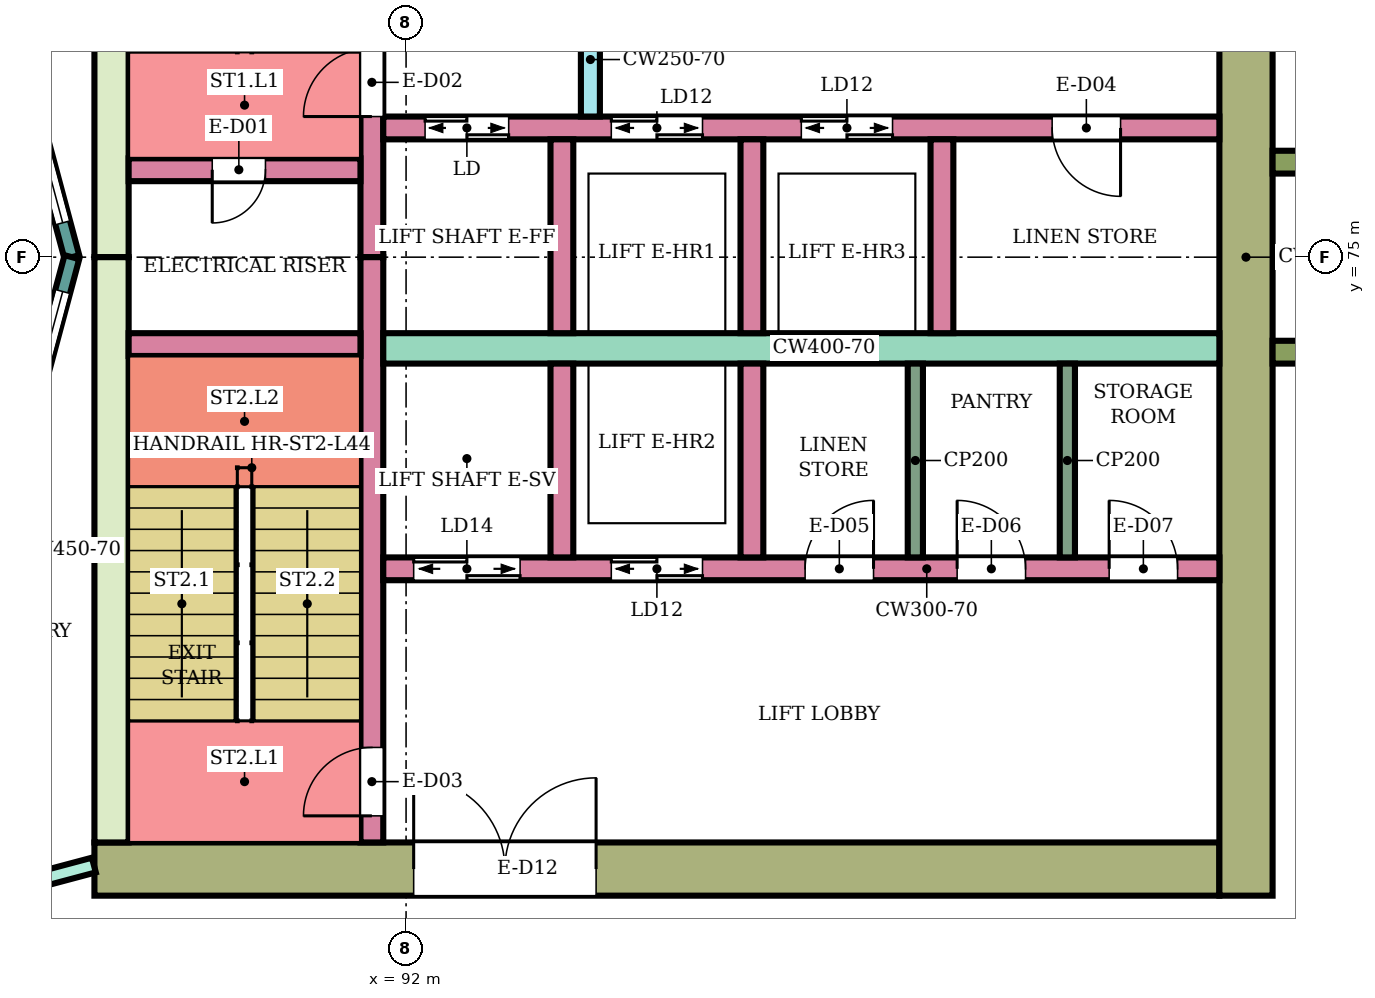
"""IFC4 building model, lengths in metres.
Left out: names, types, materials, properties, quantities, classifications, styles, units other than length and angle.
Written with IfcOpenShell. Run it as: python <this file> out.ifc"""

import sys

from ifc_helpers import new_model, si_unit, direction, frame, frame_2d, origin, place, context, subcontext, project, spatial, rectangle, extrude, element, fill, save


model = new_model("IFC4")
c1 = context("Model", 3, precision=1e-05, world=origin(), true_north=direction((0.0, 1.0)))
c2 = subcontext(c1, "Body", "Model", "MODEL_VIEW")
j1 = project(units=[si_unit("LENGTHUNIT", "METRE"), si_unit("PLANEANGLEUNIT", "RADIAN")], contexts=[c1])
p1 = place(None, origin())
s1 = spatial("IfcSite", under=j1, at=p1, CompositionType="ELEMENT")
p2 = place(p1, origin())
s2 = spatial("IfcBuilding", under=s1, at=p2, CompositionType="ELEMENT")
p3 = place(p2, frame((0.0, 0.0, 190.5)))
s3 = spatial("IfcBuildingStorey", under=s2, at=p3, CompositionType="ELEMENT", Elevation=190.5)
p4 = place(p3, frame((87.9, 66.95, 0.0), z_axis=(0.0, 0.0, 1.0), x_axis=(1.0, 0.0, 0.0)))
e1 = element("IfcWall", 1, at=p4, inside=s3, PredefinedType="SHEAR", context=c2, shape_type="SweptSolid", body=[
    extrude(rectangle(XDim=14.8, YDim=0.7, at=frame_2d((7.4, 0.0))), origin(), (0.0, 0.0, 1.0), 3.78),
])
p5 = place(p4, frame((4.2, 0.0, 0.0)))
e2 = element("IfcOpeningElement", 2, at=p5, cuts=e1, PredefinedType="OPENING", context=c2, shape_type="SweptSolid", body=[
    extrude(rectangle(XDim=2.4, YDim=2.4, at=frame_2d((1.2, 1.2))), frame((0.0, 0.36, 0.0), z_axis=(0.0, -1.0, 0.0), x_axis=(1.0, 0.0, 0.0)), (0.0, 0.0, 1.0), 0.72),
])
for number, where, z_axis, x_axis in (
    (3, (88.125, 75.0, 0.0), (0.0, 0.0, 1.0), (0.0, 1.0, 0.0)),
    (4, (88.125, 67.3, 0.0), (0.0, 0.0, 1.0), (0.0, 1.0, 0.0)),
):
    element("IfcWall", number, at=place(p3, frame(where, z_axis=z_axis, x_axis=x_axis)), inside=s3, PredefinedType="SHEAR", context=c2, shape_type="SweptSolid", body=[
        extrude(rectangle(XDim=7.7, YDim=0.45, at=frame_2d((3.85, 0.0))), origin(), (0.0, 0.0, 1.0), 3.78),
    ])
p6 = place(p3, frame((103.05, 66.6, 0.0), z_axis=(0.0, 0.0, 1.0), x_axis=(0.0, 1.0, 0.0)))
e5 = element("IfcWall", 5, at=p6, inside=s3, PredefinedType="SHEAR", context=c2, shape_type="SweptSolid", body=[
    extrude(rectangle(XDim=16.8, YDim=0.7, at=frame_2d((8.4, 0.0))), origin(), (0.0, 0.0, 1.0), 3.78),
])
p7 = place(p3, frame((91.55, 75.0, 0.0), z_axis=(0.0, 0.0, 1.0), x_axis=(0.0, 1.0, 0.0)))
e6 = element("IfcWall", 6, at=p7, inside=s3, PredefinedType="SHEAR", context=c2, shape_type="SweptSolid", body=[
    extrude(rectangle(XDim=7.7, YDim=0.3, at=frame_2d((3.85, 0.0))), origin(), (0.0, 0.0, 1.0), 3.78),
])
p8 = place(p7, frame((1.85, 0.0, 0.0)))
e7 = element("IfcOpeningElement", 7, at=p8, cuts=e6, PredefinedType="OPENING", context=c2, shape_type="SweptSolid", body=[
    extrude(rectangle(XDim=0.9, YDim=2.1, at=frame_2d((0.45, 1.05))), frame((0.0, 0.16, 0.0), z_axis=(0.0, -1.0, 0.0), x_axis=(1.0, 0.0, 0.0)), (0.0, 0.0, 1.0), 0.32),
])
p9 = place(p3, frame((91.55, 67.3, 0.0), z_axis=(0.0, 0.0, 1.0), x_axis=(0.0, 1.0, 0.0)))
e8 = element("IfcWall", 8, at=p9, inside=s3, PredefinedType="SHEAR", context=c2, shape_type="SweptSolid", body=[
    extrude(rectangle(XDim=7.7, YDim=0.3, at=frame_2d((3.85, 0.0))), origin(), (0.0, 0.0, 1.0), 3.78),
])
p10 = place(p9, frame((0.35, 0.0, 0.0)))
e9 = element("IfcOpeningElement", 9, at=p10, cuts=e8, PredefinedType="OPENING", context=c2, shape_type="SweptSolid", body=[
    extrude(rectangle(XDim=0.9, YDim=2.1, at=frame_2d((0.45, 1.05))), frame((0.0, 0.16, 0.0), z_axis=(0.0, -1.0, 0.0), x_axis=(1.0, 0.0, 0.0)), (0.0, 0.0, 1.0), 0.32),
])
p11 = place(p3, frame((88.35, 76.15, 0.0), z_axis=(0.0, 0.0, 1.0), x_axis=(1.0, 0.0, 0.0)))
e10 = element("IfcWall", 10, at=p11, inside=s3, PredefinedType="SHEAR", context=c2, shape_type="SweptSolid", body=[
    extrude(rectangle(XDim=3.05, YDim=0.3, at=frame_2d((1.525, 0.0))), origin(), (0.0, 0.0, 1.0), 3.78),
])
p12 = place(p11, frame((1.1, 0.0, 0.0)))
e11 = element("IfcOpeningElement", 11, at=p12, cuts=e10, PredefinedType="OPENING", context=c2, shape_type="SweptSolid", body=[
    extrude(rectangle(XDim=0.7, YDim=2.0, at=frame_2d((0.35, 1.0))), frame((0.0, 0.16, 0.0), z_axis=(0.0, -1.0, 0.0), x_axis=(1.0, 0.0, 0.0)), (0.0, 0.0, 1.0), 0.32),
])
p13 = place(p3, frame((88.35, 73.85, 0.0), z_axis=(0.0, 0.0, 1.0), x_axis=(1.0, 0.0, 0.0)))
e12 = element("IfcWall", 12, at=p13, inside=s3, PredefinedType="SHEAR", context=c2, shape_type="SweptSolid", body=[
    extrude(rectangle(XDim=3.05, YDim=0.3, at=frame_2d((1.525, 0.0))), origin(), (0.0, 0.0, 1.0), 3.78),
])
p14 = place(p3, frame((91.7, 76.7, 0.0), z_axis=(0.0, 0.0, 1.0), x_axis=(1.0, 0.0, 0.0)))
e13 = element("IfcWall", 13, at=p14, inside=s3, PredefinedType="SHEAR", context=c2, shape_type="SweptSolid", body=[
    extrude(rectangle(XDim=11.0, YDim=0.3, at=frame_2d((5.5, 0.0))), origin(), (0.0, 0.0, 1.0), 3.78),
])
p15 = place(p14, frame((0.55, 0.0, 0.0)))
e14 = element("IfcOpeningElement", 14, at=p15, cuts=e13, PredefinedType="OPENING", context=c2, shape_type="SweptSolid", body=[
    extrude(rectangle(XDim=1.1, YDim=2.1, at=frame_2d((0.55, 1.05))), frame((0.0, 0.16, 0.0), z_axis=(0.0, -1.0, 0.0), x_axis=(1.0, 0.0, 0.0)), (0.0, 0.0, 1.0), 0.32),
])
p16 = place(p14, frame((3.0, 0.0, 0.0)))
e15 = element("IfcOpeningElement", 15, at=p16, cuts=e13, PredefinedType="OPENING", context=c2, shape_type="SweptSolid", body=[
    extrude(rectangle(XDim=1.2, YDim=2.1, at=frame_2d((0.6, 1.05))), frame((0.0, 0.16, 0.0), z_axis=(0.0, -1.0, 0.0), x_axis=(1.0, 0.0, 0.0)), (0.0, 0.0, 1.0), 0.32),
])
p17 = place(p14, frame((5.5, 0.0, 0.0)))
e16 = element("IfcOpeningElement", 16, at=p17, cuts=e13, PredefinedType="OPENING", context=c2, shape_type="SweptSolid", body=[
    extrude(rectangle(XDim=1.2, YDim=2.1, at=frame_2d((0.6, 1.05))), frame((0.0, 0.16, 0.0), z_axis=(0.0, -1.0, 0.0), x_axis=(1.0, 0.0, 0.0)), (0.0, 0.0, 1.0), 0.32),
])
p18 = place(p14, frame((8.8, 0.0, 0.0)))
e17 = element("IfcOpeningElement", 17, at=p18, cuts=e13, PredefinedType="OPENING", context=c2, shape_type="SweptSolid", body=[
    extrude(rectangle(XDim=0.9, YDim=2.1, at=frame_2d((0.45, 1.05))), frame((0.0, 0.16, 0.0), z_axis=(0.0, -1.0, 0.0), x_axis=(1.0, 0.0, 0.0)), (0.0, 0.0, 1.0), 0.32),
])
p19 = place(p3, frame((91.7, 73.8, 0.0), z_axis=(0.0, 0.0, 1.0), x_axis=(1.0, 0.0, 0.0)))
e18 = element("IfcWall", 18, at=p19, inside=s3, PredefinedType="SHEAR", context=c2, shape_type="SweptSolid", body=[
    extrude(rectangle(XDim=11.0, YDim=0.4, at=frame_2d((5.5, 0.0))), origin(), (0.0, 0.0, 1.0), 3.78),
])
p20 = place(p3, frame((91.7, 70.9, 0.0), z_axis=(0.0, 0.0, 1.0), x_axis=(1.0, 0.0, 0.0)))
e19 = element("IfcWall", 19, at=p20, inside=s3, PredefinedType="SHEAR", context=c2, shape_type="SweptSolid", body=[
    extrude(rectangle(XDim=11.0, YDim=0.3, at=frame_2d((5.5, 0.0))), origin(), (0.0, 0.0, 1.0), 3.78),
])
p21 = place(p20, frame((0.4, 0.0, 0.0)))
e20 = element("IfcOpeningElement", 20, at=p21, cuts=e19, PredefinedType="OPENING", context=c2, shape_type="SweptSolid", body=[
    extrude(rectangle(XDim=1.4, YDim=2.1, at=frame_2d((0.7, 1.05))), frame((0.0, 0.16, 0.0), z_axis=(0.0, -1.0, 0.0), x_axis=(1.0, 0.0, 0.0)), (0.0, 0.0, 1.0), 0.32),
])
p22 = place(p20, frame((3.0, 0.0, 0.0)))
e21 = element("IfcOpeningElement", 21, at=p22, cuts=e19, PredefinedType="OPENING", context=c2, shape_type="SweptSolid", body=[
    extrude(rectangle(XDim=1.2, YDim=2.1, at=frame_2d((0.6, 1.05))), frame((0.0, 0.16, 0.0), z_axis=(0.0, -1.0, 0.0), x_axis=(1.0, 0.0, 0.0)), (0.0, 0.0, 1.0), 0.32),
])
p23 = place(p20, frame((5.55, 0.0, 0.0)))
e22 = element("IfcOpeningElement", 22, at=p23, cuts=e19, PredefinedType="OPENING", context=c2, shape_type="SweptSolid", body=[
    extrude(rectangle(XDim=0.9, YDim=2.1, at=frame_2d((0.45, 1.05))), frame((0.0, 0.16, 0.0), z_axis=(0.0, -1.0, 0.0), x_axis=(1.0, 0.0, 0.0)), (0.0, 0.0, 1.0), 0.32),
])
p24 = place(p20, frame((7.55, 0.0, 0.0)))
e23 = element("IfcOpeningElement", 23, at=p24, cuts=e19, PredefinedType="OPENING", context=c2, shape_type="SweptSolid", body=[
    extrude(rectangle(XDim=0.9, YDim=2.1, at=frame_2d((0.45, 1.05))), frame((0.0, 0.16, 0.0), z_axis=(0.0, -1.0, 0.0), x_axis=(1.0, 0.0, 0.0)), (0.0, 0.0, 1.0), 0.32),
])
p25 = place(p20, frame((9.55, 0.0, 0.0)))
e24 = element("IfcOpeningElement", 24, at=p25, cuts=e19, PredefinedType="OPENING", context=c2, shape_type="SweptSolid", body=[
    extrude(rectangle(XDim=0.9, YDim=2.1, at=frame_2d((0.45, 1.05))), frame((0.0, 0.16, 0.0), z_axis=(0.0, -1.0, 0.0), x_axis=(1.0, 0.0, 0.0)), (0.0, 0.0, 1.0), 0.32),
])
for number, where, z_axis, x_axis in (
    (25, (94.05, 74.0, 0.0), (0.0, 0.0, 1.0), (0.0, 1.0, 0.0)),
    (26, (96.55, 74.0, 0.0), (0.0, 0.0, 1.0), (0.0, 1.0, 0.0)),
    (27, (99.05, 74.0, 0.0), (0.0, 0.0, 1.0), (0.0, 1.0, 0.0)),
    (28, (94.05, 71.05, 0.0), (0.0, 0.0, 1.0), (0.0, 1.0, 0.0)),
    (29, (96.55, 71.05, 0.0), (0.0, 0.0, 1.0), (0.0, 1.0, 0.0)),
):
    element("IfcWall", number, at=place(p3, frame(where, z_axis=z_axis, x_axis=x_axis)), inside=s3, PredefinedType="SHEAR", context=c2, shape_type="SweptSolid", body=[
        extrude(rectangle(XDim=2.55, YDim=0.3, at=frame_2d((1.275, 0.0))), origin(), (0.0, 0.0, 1.0), 3.78),
    ])
p26 = place(p3, frame((94.425, 76.85, 0.0), z_axis=(0.0, 0.0, 1.0), x_axis=(0.0, 1.0, 0.0)))
e30 = element("IfcWall", 30, at=p26, inside=s3, PredefinedType="SHEAR", context=c2, shape_type="SweptSolid", body=[
    extrude(rectangle(XDim=1.5, YDim=0.25, at=frame_2d((0.75, 0.0))), origin(), (0.0, 0.0, 1.0), 3.78),
])
for number, where, z_axis, x_axis in (
    (31, (103.4, 73.75, 0.0), (0.0, 0.0, 1.0), (1.0, 0.0, 0.0)),
    (32, (103.4, 76.25, 0.0), (0.0, 0.0, 1.0), (1.0, 0.0, 0.0)),
):
    element("IfcWall", number, at=place(p3, frame(where, z_axis=z_axis, x_axis=x_axis)), inside=s3, PredefinedType="NOTDEFINED", context=c2, shape_type="SweptSolid", body=[
        extrude(rectangle(XDim=2.416, YDim=0.3, at=frame_2d((1.208, 0.0))), origin(), (0.0, 0.0, 1.0), 4.1),
    ])
p27 = place(p3, frame((87.604, 75.0, 0.0), z_axis=(0.0, 0.0, 1.0), x_axis=(-0.258789828301, 0.965933654434, 0.0)))
e33 = element("IfcWall", 33, at=p27, inside=s3, PredefinedType="NOTDEFINED", context=c2, shape_type="SweptSolid", body=[
    extrude(rectangle(XDim=3.936, YDim=0.2, at=frame_2d((1.968, 0.0))), origin(), (0.0, 0.0, 1.0), 4.1),
])
p28 = place(p27, frame((0.468, 0.0, 0.9)))
e34 = element("IfcOpeningElement", 34, at=p28, cuts=e33, PredefinedType="OPENING", context=c2, shape_type="SweptSolid", body=[
    extrude(rectangle(XDim=3.0, YDim=2.3, at=frame_2d((1.5, 1.15))), frame((0.0, 0.11, 0.0), z_axis=(0.0, -1.0, 0.0), x_axis=(1.0, 0.0, 0.0)), (0.0, 0.0, 1.0), 0.22),
])
p29 = place(p3, frame((86.585, 71.198, 0.0), z_axis=(0.0, 0.0, 1.0), x_axis=(0.258789828301, 0.965933654434, 0.0)))
e35 = element("IfcWall", 35, at=p29, inside=s3, PredefinedType="NOTDEFINED", context=c2, shape_type="SweptSolid", body=[
    extrude(rectangle(XDim=3.936, YDim=0.2, at=frame_2d((1.968, 0.0))), origin(), (0.0, 0.0, 1.0), 4.1),
])
p30 = place(p29, frame((0.468, 0.0, 0.9)))
e36 = element("IfcOpeningElement", 36, at=p30, cuts=e35, PredefinedType="OPENING", context=c2, shape_type="SweptSolid", body=[
    extrude(rectangle(XDim=3.0, YDim=2.3, at=frame_2d((1.5, 1.15))), frame((0.0, 0.11, 0.0), z_axis=(0.0, -1.0, 0.0), x_axis=(1.0, 0.0, 0.0)), (0.0, 0.0, 1.0), 0.22),
])
p31 = place(p3, frame((80.125, 64.932, 0.0), z_axis=(0.0, 0.0, 1.0), x_axis=(0.966236955806, 0.257655089674, 0.0)))
e37 = element("IfcWall", 37, at=p31, inside=s3, PredefinedType="PARTITIONING", context=c2, shape_type="SweptSolid", body=[
    extrude(rectangle(XDim=8.039, YDim=0.2, at=frame_2d((4.02, 0.0))), origin(), (0.0, 0.0, 1.0), 3.65),
])
p32 = place(p31, frame((6.298, 0.0, 0.0)))
e38 = element("IfcOpeningElement", 38, at=p32, cuts=e37, PredefinedType="OPENING", context=c2, shape_type="SweptSolid", body=[
    extrude(rectangle(XDim=0.9, YDim=2.1, at=frame_2d((0.45, 1.05))), frame((0.0, 0.11, 0.0), z_axis=(0.0, -1.0, 0.0), x_axis=(1.0, 0.0, 0.0)), (0.0, 0.0, 1.0), 0.22),
])
p33 = place(p31, frame((2.045, 0.0, 0.0)))
e39 = element("IfcOpeningElement", 39, at=p33, cuts=e37, PredefinedType="OPENING", context=c2, shape_type="SweptSolid", body=[
    extrude(rectangle(XDim=0.9, YDim=2.1, at=frame_2d((0.45, 1.05))), frame((0.0, 0.11, 0.0), z_axis=(0.0, -1.0, 0.0), x_axis=(1.0, 0.0, 0.0)), (0.0, 0.0, 1.0), 0.22),
])
for number, where, z_axis, x_axis in (
    (40, (98.7, 71.05, 0.0), (0.0, 0.0, 1.0), (0.0, 1.0, 0.0)),
    (41, (100.7, 71.05, 0.0), (0.0, 0.0, 1.0), (0.0, 1.0, 0.0)),
):
    element("IfcWall", number, at=place(p3, frame(where, z_axis=z_axis, x_axis=x_axis)), inside=s3, PredefinedType="PARTITIONING", context=c2, shape_type="SweptSolid", body=[
        extrude(rectangle(XDim=2.55, YDim=0.2, at=frame_2d((1.275, 0.0))), origin(), (0.0, 0.0, 1.0), 3.78),
    ])
p34 = place(p28, origin())
e42 = element("IfcWindow", 42, at=p34, inside=s3, PartitioningType="SINGLE_PANEL", PredefinedType="WINDOW", context=c2, shape_type="SweptSolid", body=[
    extrude(rectangle(XDim=3.0, YDim=2.3, at=frame_2d((1.5, 1.15))), frame((0.0, 0.03, 0.0), z_axis=(0.0, -1.0, 0.0), x_axis=(1.0, 0.0, 0.0)), (0.0, 0.0, 1.0), 0.06),
])
fill(e34, e42)
p35 = place(p30, origin())
e43 = element("IfcWindow", 43, at=p35, inside=s3, PartitioningType="SINGLE_PANEL", PredefinedType="WINDOW", context=c2, shape_type="SweptSolid", body=[
    extrude(rectangle(XDim=3.0, YDim=2.3, at=frame_2d((1.5, 1.15))), frame((0.0, 0.03, 0.0), z_axis=(0.0, -1.0, 0.0), x_axis=(1.0, 0.0, 0.0)), (0.0, 0.0, 1.0), 0.06),
])
fill(e36, e43)
p36 = place(p12, frame((0.7, 0.0, 0.0), z_axis=(0.0, 0.0, 1.0), x_axis=(-1.0, 0.0, 0.0)))
e44 = element("IfcDoor", 44, at=p36, inside=s3, OperationType="SINGLE_SWING_RIGHT", PredefinedType="DOOR", context=c2, shape_type="SweptSolid", body=[
    extrude(rectangle(XDim=0.7, YDim=2.0, at=frame_2d((0.35, 1.0))), frame((0.0, 0.025, 0.0), z_axis=(0.0, -1.0, 0.0), x_axis=(1.0, 0.0, 0.0)), (0.0, 0.0, 1.0), 0.05),
])
fill(e11, e44)
p37 = place(p8, origin())
e45 = element("IfcDoor", 45, at=p37, inside=s3, OperationType="SINGLE_SWING_LEFT", PredefinedType="DOOR", context=c2, shape_type="SweptSolid", body=[
    extrude(rectangle(XDim=0.9, YDim=2.1, at=frame_2d((0.45, 1.05))), frame((0.0, 0.025, 0.0), z_axis=(0.0, -1.0, 0.0), x_axis=(1.0, 0.0, 0.0)), (0.0, 0.0, 1.0), 0.05),
])
fill(e7, e45)
p38 = place(p10, origin())
e46 = element("IfcDoor", 46, at=p38, inside=s3, OperationType="SINGLE_SWING_LEFT", PredefinedType="DOOR", context=c2, shape_type="SweptSolid", body=[
    extrude(rectangle(XDim=0.9, YDim=2.1, at=frame_2d((0.45, 1.05))), frame((0.0, 0.025, 0.0), z_axis=(0.0, -1.0, 0.0), x_axis=(1.0, 0.0, 0.0)), (0.0, 0.0, 1.0), 0.05),
])
fill(e9, e46)
p39 = place(p15, origin())
e47 = element("IfcDoor", 47, at=p39, inside=s3, OperationType="DOUBLE_DOOR_SLIDING", PredefinedType="DOOR", context=c2, shape_type="SweptSolid", body=[
    extrude(rectangle(XDim=1.1, YDim=2.1, at=frame_2d((0.55, 1.05))), frame((0.0, 0.025, 0.0), z_axis=(0.0, -1.0, 0.0), x_axis=(1.0, 0.0, 0.0)), (0.0, 0.0, 1.0), 0.05),
])
fill(e14, e47)
p40 = place(p16, origin())
e48 = element("IfcDoor", 48, at=p40, inside=s3, OperationType="DOUBLE_DOOR_SLIDING", PredefinedType="DOOR", context=c2, shape_type="SweptSolid", body=[
    extrude(rectangle(XDim=1.2, YDim=2.1, at=frame_2d((0.6, 1.05))), frame((0.0, 0.025, 0.0), z_axis=(0.0, -1.0, 0.0), x_axis=(1.0, 0.0, 0.0)), (0.0, 0.0, 1.0), 0.05),
])
fill(e15, e48)
p41 = place(p17, origin())
e49 = element("IfcDoor", 49, at=p41, inside=s3, OperationType="DOUBLE_DOOR_SLIDING", PredefinedType="DOOR", context=c2, shape_type="SweptSolid", body=[
    extrude(rectangle(XDim=1.2, YDim=2.1, at=frame_2d((0.6, 1.05))), frame((0.0, 0.025, 0.0), z_axis=(0.0, -1.0, 0.0), x_axis=(1.0, 0.0, 0.0)), (0.0, 0.0, 1.0), 0.05),
])
fill(e16, e49)
p42 = place(p18, frame((0.9, 0.0, 0.0), z_axis=(0.0, 0.0, 1.0), x_axis=(-1.0, 0.0, 0.0)))
e50 = element("IfcDoor", 50, at=p42, inside=s3, OperationType="SINGLE_SWING_LEFT", PredefinedType="DOOR", context=c2, shape_type="SweptSolid", body=[
    extrude(rectangle(XDim=0.9, YDim=2.1, at=frame_2d((0.45, 1.05))), frame((0.0, 0.025, 0.0), z_axis=(0.0, -1.0, 0.0), x_axis=(1.0, 0.0, 0.0)), (0.0, 0.0, 1.0), 0.05),
])
fill(e17, e50)
p43 = place(p21, origin())
e51 = element("IfcDoor", 51, at=p43, inside=s3, OperationType="DOUBLE_DOOR_SLIDING", PredefinedType="DOOR", context=c2, shape_type="SweptSolid", body=[
    extrude(rectangle(XDim=1.4, YDim=2.1, at=frame_2d((0.7, 1.05))), frame((0.0, 0.025, 0.0), z_axis=(0.0, -1.0, 0.0), x_axis=(1.0, 0.0, 0.0)), (0.0, 0.0, 1.0), 0.05),
])
fill(e20, e51)
p44 = place(p22, origin())
e52 = element("IfcDoor", 52, at=p44, inside=s3, OperationType="DOUBLE_DOOR_SLIDING", PredefinedType="DOOR", context=c2, shape_type="SweptSolid", body=[
    extrude(rectangle(XDim=1.2, YDim=2.1, at=frame_2d((0.6, 1.05))), frame((0.0, 0.025, 0.0), z_axis=(0.0, -1.0, 0.0), x_axis=(1.0, 0.0, 0.0)), (0.0, 0.0, 1.0), 0.05),
])
fill(e21, e52)
p45 = place(p23, origin())
e53 = element("IfcDoor", 53, at=p45, inside=s3, OperationType="SINGLE_SWING_RIGHT", PredefinedType="DOOR", context=c2, shape_type="SweptSolid", body=[
    extrude(rectangle(XDim=0.9, YDim=2.1, at=frame_2d((0.45, 1.05))), frame((0.0, 0.025, 0.0), z_axis=(0.0, -1.0, 0.0), x_axis=(1.0, 0.0, 0.0)), (0.0, 0.0, 1.0), 0.05),
])
fill(e22, e53)
p46 = place(p24, origin())
e54 = element("IfcDoor", 54, at=p46, inside=s3, OperationType="SINGLE_SWING_LEFT", PredefinedType="DOOR", context=c2, shape_type="SweptSolid", body=[
    extrude(rectangle(XDim=0.9, YDim=2.1, at=frame_2d((0.45, 1.05))), frame((0.0, 0.025, 0.0), z_axis=(0.0, -1.0, 0.0), x_axis=(1.0, 0.0, 0.0)), (0.0, 0.0, 1.0), 0.05),
])
fill(e23, e54)
p47 = place(p25, origin())
e55 = element("IfcDoor", 55, at=p47, inside=s3, OperationType="SINGLE_SWING_LEFT", PredefinedType="DOOR", context=c2, shape_type="SweptSolid", body=[
    extrude(rectangle(XDim=0.9, YDim=2.1, at=frame_2d((0.45, 1.05))), frame((0.0, 0.025, 0.0), z_axis=(0.0, -1.0, 0.0), x_axis=(1.0, 0.0, 0.0)), (0.0, 0.0, 1.0), 0.05),
])
fill(e24, e55)
p48 = place(p5, origin())
e56 = element("IfcDoor", 56, at=p48, inside=s3, OperationType="DOUBLE_DOOR_SINGLE_SWING", PredefinedType="DOOR", context=c2, shape_type="SweptSolid", body=[
    extrude(rectangle(XDim=2.4, YDim=2.4, at=frame_2d((1.2, 1.2))), frame((0.0, 0.025, 0.0), z_axis=(0.0, -1.0, 0.0), x_axis=(1.0, 0.0, 0.0)), (0.0, 0.0, 1.0), 0.05),
])
fill(e2, e56)
save(model, sys.argv[1])
